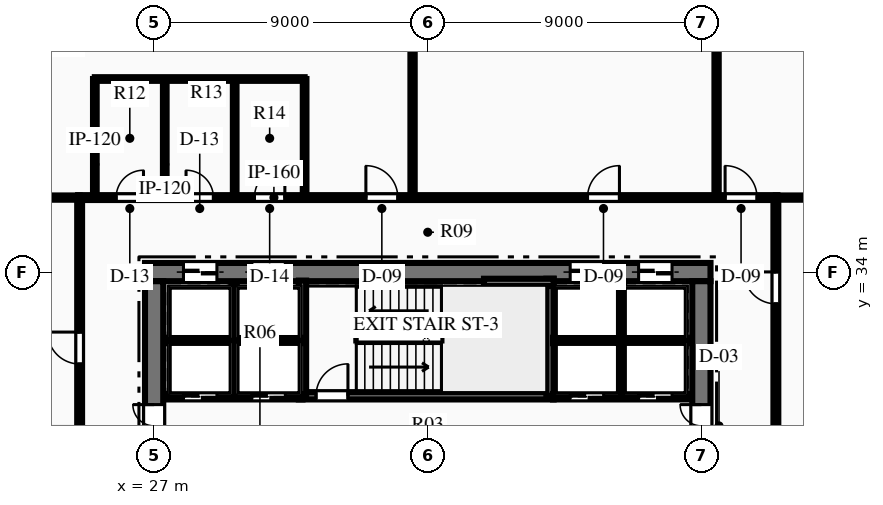
"""IFC4 building model, lengths in metres.
Left out: names, types, materials, properties, quantities, classifications, styles, units other than length and angle.
Written with IfcOpenShell. Run it as: python <this file> out.ifc"""

import sys

from ifc_helpers import new_model, si_unit, direction, frame, frame_2d, origin, place, context, subcontext, project, spatial, rectangle, extrude, element, fill, save


model = new_model("IFC4")
c1 = context("Model", 3, precision=1e-05, world=origin(), true_north=direction((0.0, 1.0)))
c2 = subcontext(c1, "Body", "Model", "MODEL_VIEW")
j1 = project(units=[si_unit("LENGTHUNIT", "METRE"), si_unit("PLANEANGLEUNIT", "RADIAN")], contexts=[c1])
p1 = place(None, origin())
s1 = spatial("IfcSite", under=j1, at=p1, CompositionType="ELEMENT")
p2 = place(p1, origin())
s2 = spatial("IfcBuilding", under=s1, at=p2, CompositionType="ELEMENT")
p3 = place(p2, frame((0.0, 0.0, 73.95)))
s3 = spatial("IfcBuildingStorey", under=s2, at=p3, CompositionType="ELEMENT", Elevation=73.95)
p4 = place(p3, frame((26.7, 34.0, 0.0), z_axis=(0.0, 0.0, 1.0), x_axis=(1.0, 0.0, 0.0)))
e1 = element("IfcWall", 1, at=p4, inside=s3, PredefinedType="SHEAR", context=c2, shape_type="SweptSolid", body=[
    extrude(rectangle(XDim=18.6, YDim=0.6, at=frame_2d((9.3, 0.0))), origin(), (0.0, 0.0, 1.0), 3.75),
])
p5 = place(p4, frame((1.265, 0.0, 0.0)))
e2 = element("IfcOpeningElement", 2, at=p5, cuts=e1, PredefinedType="OPENING", context=c2, shape_type="SweptSolid", body=[
    extrude(rectangle(XDim=1.1, YDim=2.15, at=frame_2d((0.55, 1.075))), frame((0.0, 0.31, 0.0), z_axis=(0.0, -1.0, 0.0), x_axis=(1.0, 0.0, 0.0)), (0.0, 0.0, 1.0), 0.62),
])
p6 = place(p4, frame((3.515, 0.0, 0.0)))
e3 = element("IfcOpeningElement", 3, at=p6, cuts=e1, PredefinedType="OPENING", context=c2, shape_type="SweptSolid", body=[
    extrude(rectangle(XDim=1.1, YDim=2.15, at=frame_2d((0.55, 1.075))), frame((0.0, 0.31, 0.0), z_axis=(0.0, -1.0, 0.0), x_axis=(1.0, 0.0, 0.0)), (0.0, 0.0, 1.0), 0.62),
])
p7 = place(p4, frame((13.985, 0.0, 0.0)))
e4 = element("IfcOpeningElement", 4, at=p7, cuts=e1, PredefinedType="OPENING", context=c2, shape_type="SweptSolid", body=[
    extrude(rectangle(XDim=1.1, YDim=2.15, at=frame_2d((0.55, 1.075))), frame((0.0, 0.31, 0.0), z_axis=(0.0, -1.0, 0.0), x_axis=(1.0, 0.0, 0.0)), (0.0, 0.0, 1.0), 0.62),
])
p8 = place(p4, frame((16.235, 0.0, 0.0)))
e5 = element("IfcOpeningElement", 5, at=p8, cuts=e1, PredefinedType="OPENING", context=c2, shape_type="SweptSolid", body=[
    extrude(rectangle(XDim=1.1, YDim=2.15, at=frame_2d((0.55, 1.075))), frame((0.0, 0.31, 0.0), z_axis=(0.0, -1.0, 0.0), x_axis=(1.0, 0.0, 0.0)), (0.0, 0.0, 1.0), 0.62),
])
p9 = place(p3, frame((27.0, 18.3, 0.0), z_axis=(0.0, 0.0, 1.0), x_axis=(0.0, 1.0, 0.0)))
e6 = element("IfcWall", 6, at=p9, inside=s3, PredefinedType="SHEAR", context=c2, shape_type="SweptSolid", body=[
    extrude(rectangle(XDim=15.4, YDim=0.6, at=frame_2d((7.7, 0.0))), origin(), (0.0, 0.0, 1.0), 3.75),
])
p10 = place(p9, frame((9.94, 0.0, 0.0)))
e7 = element("IfcOpeningElement", 7, at=p10, cuts=e6, PredefinedType="OPENING", context=c2, shape_type="SweptSolid", body=[
    extrude(rectangle(XDim=1.4, YDim=2.2, at=frame_2d((0.7, 1.1))), frame((0.0, 0.31, 0.0), z_axis=(0.0, -1.0, 0.0), x_axis=(1.0, 0.0, 0.0)), (0.0, 0.0, 1.0), 0.62),
])
p11 = place(p3, frame((45.0, 18.3, 0.0), z_axis=(0.0, 0.0, 1.0), x_axis=(0.0, 1.0, 0.0)))
e8 = element("IfcWall", 8, at=p11, inside=s3, PredefinedType="SHEAR", context=c2, shape_type="SweptSolid", body=[
    extrude(rectangle(XDim=15.4, YDim=0.6, at=frame_2d((7.7, 0.0))), origin(), (0.0, 0.0, 1.0), 3.75),
])
p12 = place(p11, frame((9.94, 0.0, 0.0)))
e9 = element("IfcOpeningElement", 9, at=p12, cuts=e8, PredefinedType="OPENING", context=c2, shape_type="SweptSolid", body=[
    extrude(rectangle(XDim=1.4, YDim=2.2, at=frame_2d((0.7, 1.1))), frame((0.0, 0.31, 0.0), z_axis=(0.0, -1.0, 0.0), x_axis=(1.0, 0.0, 0.0)), (0.0, 0.0, 1.0), 0.62),
])
p13 = place(p3, frame((31.76, 29.93, 0.0), z_axis=(0.0, 0.0, 1.0), x_axis=(1.0, 0.0, 0.0)))
e10 = element("IfcWall", 10, at=p13, inside=s3, PredefinedType="SHEAR", context=c2, shape_type="SweptSolid", body=[
    extrude(rectangle(XDim=8.38, YDim=0.24, at=frame_2d((4.19, 0.0))), origin(), (0.0, 0.0, 1.0), 3.75),
])
p14 = place(p13, frame((0.565, 0.0, 0.0)))
e11 = element("IfcOpeningElement", 11, at=p14, cuts=e10, PredefinedType="OPENING", context=c2, shape_type="SweptSolid", body=[
    extrude(rectangle(XDim=1.05, YDim=2.15, at=frame_2d((0.525, 1.075))), frame((0.0, 0.13, 0.0), z_axis=(0.0, -1.0, 0.0), x_axis=(1.0, 0.0, 0.0)), (0.0, 0.0, 1.0), 0.26),
])
p15 = place(p3, frame((31.88, 29.93, 0.0), z_axis=(0.0, 0.0, 1.0), x_axis=(0.0, 1.0, 0.0)))
e12 = element("IfcWall", 12, at=p15, inside=s3, PredefinedType="SHEAR", context=c2, shape_type="SweptSolid", body=[
    extrude(rectangle(XDim=3.79, YDim=0.24, at=frame_2d((1.895, 0.0))), origin(), (0.0, 0.0, 1.0), 3.75),
])
p16 = place(p3, frame((40.02, 29.93, 0.0), z_axis=(0.0, 0.0, 1.0), x_axis=(0.0, 1.0, 0.0)))
e13 = element("IfcWall", 13, at=p16, inside=s3, PredefinedType="SHEAR", context=c2, shape_type="SweptSolid", body=[
    extrude(rectangle(XDim=3.85, YDim=0.24, at=frame_2d((1.925, 0.0))), origin(), (0.0, 0.0, 1.0), 3.75),
])
p17 = place(p3, frame((37.85, 33.66, 0.0), z_axis=(0.0, 0.0, 1.0), x_axis=(1.0, 0.0, 0.0)))
e14 = element("IfcWall", 14, at=p17, inside=s3, PredefinedType="SHEAR", context=c2, shape_type="SweptSolid", body=[
    extrude(rectangle(XDim=2.29, YDim=0.24, at=frame_2d((1.145, 0.0))), origin(), (0.0, 0.0, 1.0), 3.75),
])
p18 = place(p3, frame((27.45, 29.9, 0.0), z_axis=(0.0, 0.0, 1.0), x_axis=(1.0, 0.0, 0.0)))
e15 = element("IfcWall", 15, at=p18, inside=s3, PredefinedType="PARTITIONING", context=c2, shape_type="SweptSolid", body=[
    extrude(rectangle(XDim=4.43, YDim=0.18, at=frame_2d((2.215, 0.0))), origin(), (0.0, 0.0, 1.0), 3.44),
])
p19 = place(p18, frame((0.515, 0.0, 0.0)))
e16 = element("IfcOpeningElement", 16, at=p19, cuts=e15, PredefinedType="OPENING", context=c2, shape_type="SweptSolid", body=[
    extrude(rectangle(XDim=1.1, YDim=2.15, at=frame_2d((0.55, 1.075))), frame((0.0, 0.1, 0.0), z_axis=(0.0, -1.0, 0.0), x_axis=(1.0, 0.0, 0.0)), (0.0, 0.0, 1.0), 0.2),
])
p20 = place(p18, frame((2.765, 0.0, 0.0)))
e17 = element("IfcOpeningElement", 17, at=p20, cuts=e15, PredefinedType="OPENING", context=c2, shape_type="SweptSolid", body=[
    extrude(rectangle(XDim=1.1, YDim=2.15, at=frame_2d((0.55, 1.075))), frame((0.0, 0.1, 0.0), z_axis=(0.0, -1.0, 0.0), x_axis=(1.0, 0.0, 0.0)), (0.0, 0.0, 1.0), 0.2),
])
p21 = place(p3, frame((27.45, 31.75, 0.0), z_axis=(0.0, 0.0, 1.0), x_axis=(1.0, 0.0, 0.0)))
e18 = element("IfcWall", 18, at=p21, inside=s3, PredefinedType="PARTITIONING", context=c2, shape_type="SweptSolid", body=[
    extrude(rectangle(XDim=4.43, YDim=0.18, at=frame_2d((2.215, 0.0))), origin(), (0.0, 0.0, 1.0), 3.44),
])
p22 = place(p3, frame((29.63, 29.9, 0.0), z_axis=(0.0, 0.0, 1.0), x_axis=(0.0, 1.0, 0.0)))
e19 = element("IfcWall", 19, at=p22, inside=s3, PredefinedType="PARTITIONING", context=c2, shape_type="SweptSolid", body=[
    extrude(rectangle(XDim=3.75, YDim=0.18, at=frame_2d((1.875, 0.0))), origin(), (0.0, 0.0, 1.0), 3.44),
])
p23 = place(p3, frame((40.12, 29.9, 0.0), z_axis=(0.0, 0.0, 1.0), x_axis=(1.0, 0.0, 0.0)))
e20 = element("IfcWall", 20, at=p23, inside=s3, PredefinedType="PARTITIONING", context=c2, shape_type="SweptSolid", body=[
    extrude(rectangle(XDim=4.43, YDim=0.18, at=frame_2d((2.215, 0.0))), origin(), (0.0, 0.0, 1.0), 3.44),
])
p24 = place(p23, frame((0.565, 0.0, 0.0)))
e21 = element("IfcOpeningElement", 21, at=p24, cuts=e20, PredefinedType="OPENING", context=c2, shape_type="SweptSolid", body=[
    extrude(rectangle(XDim=1.1, YDim=2.15, at=frame_2d((0.55, 1.075))), frame((0.0, 0.1, 0.0), z_axis=(0.0, -1.0, 0.0), x_axis=(1.0, 0.0, 0.0)), (0.0, 0.0, 1.0), 0.2),
])
p25 = place(p23, frame((2.815, 0.0, 0.0)))
e22 = element("IfcOpeningElement", 22, at=p25, cuts=e20, PredefinedType="OPENING", context=c2, shape_type="SweptSolid", body=[
    extrude(rectangle(XDim=1.1, YDim=2.15, at=frame_2d((0.55, 1.075))), frame((0.0, 0.1, 0.0), z_axis=(0.0, -1.0, 0.0), x_axis=(1.0, 0.0, 0.0)), (0.0, 0.0, 1.0), 0.2),
])
p26 = place(p3, frame((40.12, 31.75, 0.0), z_axis=(0.0, 0.0, 1.0), x_axis=(1.0, 0.0, 0.0)))
e23 = element("IfcWall", 23, at=p26, inside=s3, PredefinedType="PARTITIONING", context=c2, shape_type="SweptSolid", body=[
    extrude(rectangle(XDim=4.43, YDim=0.18, at=frame_2d((2.215, 0.0))), origin(), (0.0, 0.0, 1.0), 3.44),
])
p27 = place(p3, frame((42.37, 29.9, 0.0), z_axis=(0.0, 0.0, 1.0), x_axis=(0.0, 1.0, 0.0)))
e24 = element("IfcWall", 24, at=p27, inside=s3, PredefinedType="PARTITIONING", context=c2, shape_type="SweptSolid", body=[
    extrude(rectangle(XDim=3.75, YDim=0.18, at=frame_2d((1.875, 0.0))), origin(), (0.0, 0.0, 1.0), 3.44),
])
p28 = place(p3, frame((24.5, 36.45, 0.0), z_axis=(0.0, 0.0, 1.0), x_axis=(1.0, 0.0, 0.0)))
e25 = element("IfcWall", 25, at=p28, inside=s3, PredefinedType="PARTITIONING", context=c2, shape_type="SweptSolid", body=[
    extrude(rectangle(XDim=23.0, YDim=0.16, at=frame_2d((11.5, 0.0))), origin(), (0.0, 0.0, 1.0), 3.44),
])
p29 = place(p28, frame((1.25, 0.0, 0.0)))
e26 = element("IfcOpeningElement", 26, at=p29, cuts=e25, PredefinedType="OPENING", context=c2, shape_type="SweptSolid", body=[
    extrude(rectangle(XDim=0.9, YDim=2.15, at=frame_2d((0.45, 1.075))), frame((0.0, 0.09, 0.0), z_axis=(0.0, -1.0, 0.0), x_axis=(1.0, 0.0, 0.0)), (0.0, 0.0, 1.0), 0.18),
])
p30 = place(p28, frame((3.55, 0.0, 0.0)))
e27 = element("IfcOpeningElement", 27, at=p30, cuts=e25, PredefinedType="OPENING", context=c2, shape_type="SweptSolid", body=[
    extrude(rectangle(XDim=0.9, YDim=2.15, at=frame_2d((0.45, 1.075))), frame((0.0, 0.09, 0.0), z_axis=(0.0, -1.0, 0.0), x_axis=(1.0, 0.0, 0.0)), (0.0, 0.0, 1.0), 0.18),
])
p31 = place(p28, frame((5.8, 0.0, 0.0)))
e28 = element("IfcOpeningElement", 28, at=p31, cuts=e25, PredefinedType="OPENING", context=c2, shape_type="SweptSolid", body=[
    extrude(rectangle(XDim=1.0, YDim=2.15, at=frame_2d((0.5, 1.075))), frame((0.0, 0.09, 0.0), z_axis=(0.0, -1.0, 0.0), x_axis=(1.0, 0.0, 0.0)), (0.0, 0.0, 1.0), 0.18),
])
p32 = place(p28, frame((9.465, 0.0, 0.0)))
e29 = element("IfcOpeningElement", 29, at=p32, cuts=e25, PredefinedType="OPENING", context=c2, shape_type="SweptSolid", body=[
    extrude(rectangle(XDim=1.05, YDim=2.15, at=frame_2d((0.525, 1.075))), frame((0.0, 0.09, 0.0), z_axis=(0.0, -1.0, 0.0), x_axis=(1.0, 0.0, 0.0)), (0.0, 0.0, 1.0), 0.18),
])
p33 = place(p28, frame((16.755, 0.0, 0.0)))
e30 = element("IfcOpeningElement", 30, at=p33, cuts=e25, PredefinedType="OPENING", context=c2, shape_type="SweptSolid", body=[
    extrude(rectangle(XDim=1.05, YDim=2.15, at=frame_2d((0.525, 1.075))), frame((0.0, 0.09, 0.0), z_axis=(0.0, -1.0, 0.0), x_axis=(1.0, 0.0, 0.0)), (0.0, 0.0, 1.0), 0.18),
])
p34 = place(p28, frame((21.28, 0.0, 0.0)))
e31 = element("IfcOpeningElement", 31, at=p34, cuts=e25, PredefinedType="OPENING", context=c2, shape_type="SweptSolid", body=[
    extrude(rectangle(XDim=1.05, YDim=2.15, at=frame_2d((0.525, 1.075))), frame((0.0, 0.09, 0.0), z_axis=(0.0, -1.0, 0.0), x_axis=(1.0, 0.0, 0.0)), (0.0, 0.0, 1.0), 0.18),
])
p35 = place(p3, frame((24.55, 15.55, 0.0), z_axis=(0.0, 0.0, 1.0), x_axis=(0.0, 1.0, 0.0)))
e32 = element("IfcWall", 32, at=p35, inside=s3, PredefinedType="PARTITIONING", context=c2, shape_type="SweptSolid", body=[
    extrude(rectangle(XDim=20.9, YDim=0.16, at=frame_2d((10.45, 0.0))), origin(), (0.0, 0.0, 1.0), 3.44),
])
p36 = place(p35, frame((1.862, 0.0, 0.0)))
e33 = element("IfcOpeningElement", 33, at=p36, cuts=e32, PredefinedType="OPENING", context=c2, shape_type="SweptSolid", body=[
    extrude(rectangle(XDim=1.05, YDim=2.15, at=frame_2d((0.525, 1.075))), frame((0.0, 0.09, 0.0), z_axis=(0.0, -1.0, 0.0), x_axis=(1.0, 0.0, 0.0)), (0.0, 0.0, 1.0), 0.18),
])
p37 = place(p35, frame((10.509, 0.0, 0.0)))
e34 = element("IfcOpeningElement", 34, at=p37, cuts=e32, PredefinedType="OPENING", context=c2, shape_type="SweptSolid", body=[
    extrude(rectangle(XDim=1.05, YDim=2.15, at=frame_2d((0.525, 1.075))), frame((0.0, 0.09, 0.0), z_axis=(0.0, -1.0, 0.0), x_axis=(1.0, 0.0, 0.0)), (0.0, 0.0, 1.0), 0.18),
])
p38 = place(p35, frame((15.426, 0.0, 0.0)))
e35 = element("IfcOpeningElement", 35, at=p38, cuts=e32, PredefinedType="OPENING", context=c2, shape_type="SweptSolid", body=[
    extrude(rectangle(XDim=1.05, YDim=2.15, at=frame_2d((0.525, 1.075))), frame((0.0, 0.09, 0.0), z_axis=(0.0, -1.0, 0.0), x_axis=(1.0, 0.0, 0.0)), (0.0, 0.0, 1.0), 0.18),
])
p39 = place(p3, frame((47.45, 15.55, 0.0), z_axis=(0.0, 0.0, 1.0), x_axis=(0.0, 1.0, 0.0)))
e36 = element("IfcWall", 36, at=p39, inside=s3, PredefinedType="PARTITIONING", context=c2, shape_type="SweptSolid", body=[
    extrude(rectangle(XDim=20.9, YDim=0.16, at=frame_2d((10.45, 0.0))), origin(), (0.0, 0.0, 1.0), 3.44),
])
p40 = place(p39, frame((5.616, 0.0, 0.0)))
e37 = element("IfcOpeningElement", 37, at=p40, cuts=e36, PredefinedType="OPENING", context=c2, shape_type="SweptSolid", body=[
    extrude(rectangle(XDim=1.05, YDim=2.15, at=frame_2d((0.525, 1.075))), frame((0.0, 0.09, 0.0), z_axis=(0.0, -1.0, 0.0), x_axis=(1.0, 0.0, 0.0)), (0.0, 0.0, 1.0), 0.18),
])
p41 = place(p39, frame((17.405, 0.0, 0.0)))
e38 = element("IfcOpeningElement", 38, at=p41, cuts=e36, PredefinedType="OPENING", context=c2, shape_type="SweptSolid", body=[
    extrude(rectangle(XDim=1.05, YDim=2.15, at=frame_2d((0.525, 1.075))), frame((0.0, 0.09, 0.0), z_axis=(0.0, -1.0, 0.0), x_axis=(1.0, 0.0, 0.0)), (0.0, 0.0, 1.0), 0.18),
])
for number, where, z_axis, x_axis in (
    (39, (25.05, 36.45, 0.0), (0.0, 0.0, 1.0), (0.0, 1.0, 0.0)),
    (40, (27.35, 36.45, 0.0), (0.0, 0.0, 1.0), (0.0, 1.0, 0.0)),
    (41, (29.65, 36.45, 0.0), (0.0, 0.0, 1.0), (0.0, 1.0, 0.0)),
    (42, (31.95, 36.45, 0.0), (0.0, 0.0, 1.0), (0.0, 1.0, 0.0)),
):
    element("IfcWall", number, at=place(p3, frame(where, z_axis=z_axis, x_axis=x_axis)), inside=s3, PredefinedType="PARTITIONING", context=c2, shape_type="SweptSolid", body=[
        extrude(rectangle(XDim=3.9, YDim=0.12, at=frame_2d((1.95, 0.0))), origin(), (0.0, 0.0, 1.0), 3.44),
    ])
p42 = place(p3, frame((25.05, 40.35, 0.0), z_axis=(0.0, 0.0, 1.0), x_axis=(1.0, 0.0, 0.0)))
e43 = element("IfcWall", 43, at=p42, inside=s3, PredefinedType="PARTITIONING", context=c2, shape_type="SweptSolid", body=[
    extrude(rectangle(XDim=6.9, YDim=0.12, at=frame_2d((3.45, 0.0))), origin(), (0.0, 0.0, 1.0), 3.44),
])
p43 = place(p3, frame((6.032, 36.45, 0.0), z_axis=(0.0, 0.0, 1.0), x_axis=(1.0, 0.0, 0.0)))
e44 = element("IfcWall", 44, at=p43, inside=s3, PredefinedType="PARTITIONING", context=c2, shape_type="SweptSolid", body=[
    extrude(rectangle(XDim=18.518, YDim=0.14, at=frame_2d((9.259, 0.0))), origin(), (0.0, 0.0, 1.0), 2.972),
])
p44 = place(p3, frame((47.45, 36.45, 0.0), z_axis=(0.0, 0.0, 1.0), x_axis=(1.0, 0.0, 0.0)))
e45 = element("IfcWall", 45, at=p44, inside=s3, PredefinedType="PARTITIONING", context=c2, shape_type="SweptSolid", body=[
    extrude(rectangle(XDim=13.384, YDim=0.14, at=frame_2d((6.692, 0.0))), origin(), (0.0, 0.0, 1.0), 3.44),
])
p45 = place(p3, frame((35.5, 36.45, 0.0), z_axis=(0.0, 0.0, 1.0), x_axis=(0.0, 1.0, 0.0)))
e46 = element("IfcWall", 46, at=p45, inside=s3, PredefinedType="PARTITIONING", context=c2, shape_type="SweptSolid", body=[
    extrude(rectangle(XDim=15.798, YDim=0.14, at=frame_2d((7.899, 0.0))), origin(), (0.0, 0.0, 1.0), 3.44),
])
p46 = place(p3, frame((45.5, 36.45, 0.0), z_axis=(0.0, 0.0, 1.0), x_axis=(0.0, 1.0, 0.0)))
e47 = element("IfcWall", 47, at=p46, inside=s3, PredefinedType="PARTITIONING", context=c2, shape_type="SweptSolid", body=[
    extrude(rectangle(XDim=18.255, YDim=0.14, at=frame_2d((9.127, 0.0))), origin(), (0.0, 0.0, 1.0), 2.972),
])
p47 = place(p14, origin())
e48 = element("IfcDoor", 48, at=p47, inside=s3, OperationType="SINGLE_SWING_RIGHT", PredefinedType="DOOR", context=c2, shape_type="SweptSolid", body=[
    extrude(rectangle(XDim=1.05, YDim=2.15, at=frame_2d((0.525, 1.075))), frame((0.0, 0.025, 0.0), z_axis=(0.0, -1.0, 0.0), x_axis=(1.0, 0.0, 0.0)), (0.0, 0.0, 1.0), 0.05),
])
fill(e11, e48)
p48 = place(p10, origin())
e49 = element("IfcDoor", 49, at=p48, inside=s3, OperationType="DOUBLE_DOOR_SINGLE_SWING", PredefinedType="DOOR", context=c2, shape_type="SweptSolid", body=[
    extrude(rectangle(XDim=1.4, YDim=2.2, at=frame_2d((0.7, 1.1))), frame((0.0, 0.025, 0.0), z_axis=(0.0, -1.0, 0.0), x_axis=(1.0, 0.0, 0.0)), (0.0, 0.0, 1.0), 0.05),
])
fill(e7, e49)
p49 = place(p12, origin())
e50 = element("IfcDoor", 50, at=p49, inside=s3, OperationType="DOUBLE_DOOR_SINGLE_SWING", PredefinedType="DOOR", context=c2, shape_type="SweptSolid", body=[
    extrude(rectangle(XDim=1.4, YDim=2.2, at=frame_2d((0.7, 1.1))), frame((0.0, 0.025, 0.0), z_axis=(0.0, -1.0, 0.0), x_axis=(1.0, 0.0, 0.0)), (0.0, 0.0, 1.0), 0.05),
])
fill(e9, e50)
p50 = place(p29, origin())
e51 = element("IfcDoor", 51, at=p50, inside=s3, OperationType="SINGLE_SWING_RIGHT", PredefinedType="DOOR", context=c2, shape_type="SweptSolid", body=[
    extrude(rectangle(XDim=0.9, YDim=2.15, at=frame_2d((0.45, 1.075))), frame((0.0, 0.025, 0.0), z_axis=(0.0, -1.0, 0.0), x_axis=(1.0, 0.0, 0.0)), (0.0, 0.0, 1.0), 0.05),
])
fill(e26, e51)
p51 = place(p30, origin())
e52 = element("IfcDoor", 52, at=p51, inside=s3, OperationType="SINGLE_SWING_LEFT", PredefinedType="DOOR", context=c2, shape_type="SweptSolid", body=[
    extrude(rectangle(XDim=0.9, YDim=2.15, at=frame_2d((0.45, 1.075))), frame((0.0, 0.025, 0.0), z_axis=(0.0, -1.0, 0.0), x_axis=(1.0, 0.0, 0.0)), (0.0, 0.0, 1.0), 0.05),
])
fill(e27, e52)
p52 = place(p31, origin())
e53 = element("IfcDoor", 53, at=p52, inside=s3, OperationType="SINGLE_SWING_RIGHT", PredefinedType="DOOR", context=c2, shape_type="SweptSolid", body=[
    extrude(rectangle(XDim=1.0, YDim=2.15, at=frame_2d((0.5, 1.075))), frame((0.0, 0.025, 0.0), z_axis=(0.0, -1.0, 0.0), x_axis=(1.0, 0.0, 0.0)), (0.0, 0.0, 1.0), 0.05),
])
fill(e28, e53)
p53 = place(p32, origin())
e54 = element("IfcDoor", 54, at=p53, inside=s3, OperationType="SINGLE_SWING_LEFT", PredefinedType="DOOR", context=c2, shape_type="SweptSolid", body=[
    extrude(rectangle(XDim=1.05, YDim=2.15, at=frame_2d((0.525, 1.075))), frame((0.0, 0.025, 0.0), z_axis=(0.0, -1.0, 0.0), x_axis=(1.0, 0.0, 0.0)), (0.0, 0.0, 1.0), 0.05),
])
fill(e29, e54)
p54 = place(p33, origin())
e55 = element("IfcDoor", 55, at=p54, inside=s3, OperationType="SINGLE_SWING_RIGHT", PredefinedType="DOOR", context=c2, shape_type="SweptSolid", body=[
    extrude(rectangle(XDim=1.05, YDim=2.15, at=frame_2d((0.525, 1.075))), frame((0.0, 0.025, 0.0), z_axis=(0.0, -1.0, 0.0), x_axis=(1.0, 0.0, 0.0)), (0.0, 0.0, 1.0), 0.05),
])
fill(e30, e55)
p55 = place(p34, origin())
e56 = element("IfcDoor", 56, at=p55, inside=s3, OperationType="SINGLE_SWING_LEFT", PredefinedType="DOOR", context=c2, shape_type="SweptSolid", body=[
    extrude(rectangle(XDim=1.05, YDim=2.15, at=frame_2d((0.525, 1.075))), frame((0.0, 0.025, 0.0), z_axis=(0.0, -1.0, 0.0), x_axis=(1.0, 0.0, 0.0)), (0.0, 0.0, 1.0), 0.05),
])
fill(e31, e56)
p56 = place(p38, origin())
e57 = element("IfcDoor", 57, at=p56, inside=s3, OperationType="SINGLE_SWING_RIGHT", PredefinedType="DOOR", context=c2, shape_type="SweptSolid", body=[
    extrude(rectangle(XDim=1.05, YDim=2.15, at=frame_2d((0.525, 1.075))), frame((0.0, 0.025, 0.0), z_axis=(0.0, -1.0, 0.0), x_axis=(1.0, 0.0, 0.0)), (0.0, 0.0, 1.0), 0.05),
])
fill(e35, e57)
p57 = place(p41, origin())
e58 = element("IfcDoor", 58, at=p57, inside=s3, OperationType="SINGLE_SWING_RIGHT", PredefinedType="DOOR", context=c2, shape_type="SweptSolid", body=[
    extrude(rectangle(XDim=1.05, YDim=2.15, at=frame_2d((0.525, 1.075))), frame((0.0, 0.025, 0.0), z_axis=(0.0, -1.0, 0.0), x_axis=(1.0, 0.0, 0.0)), (0.0, 0.0, 1.0), 0.05),
])
fill(e38, e58)
p58 = place(p19, origin())
e59 = element("IfcDoor", 59, at=p58, inside=s3, OperationType="SLIDING_TO_LEFT", PredefinedType="DOOR", context=c2, shape_type="SweptSolid", body=[
    extrude(rectangle(XDim=1.1, YDim=2.15, at=frame_2d((0.55, 1.075))), frame((0.0, 0.025, 0.0), z_axis=(0.0, -1.0, 0.0), x_axis=(1.0, 0.0, 0.0)), (0.0, 0.0, 1.0), 0.05),
])
fill(e16, e59)
p59 = place(p20, origin())
e60 = element("IfcDoor", 60, at=p59, inside=s3, OperationType="SLIDING_TO_LEFT", PredefinedType="DOOR", context=c2, shape_type="SweptSolid", body=[
    extrude(rectangle(XDim=1.1, YDim=2.15, at=frame_2d((0.55, 1.075))), frame((0.0, 0.025, 0.0), z_axis=(0.0, -1.0, 0.0), x_axis=(1.0, 0.0, 0.0)), (0.0, 0.0, 1.0), 0.05),
])
fill(e17, e60)
p60 = place(p5, origin())
e61 = element("IfcDoor", 61, at=p60, inside=s3, OperationType="SLIDING_TO_LEFT", PredefinedType="DOOR", context=c2, shape_type="SweptSolid", body=[
    extrude(rectangle(XDim=1.1, YDim=2.15, at=frame_2d((0.55, 1.075))), frame((0.0, 0.025, 0.0), z_axis=(0.0, -1.0, 0.0), x_axis=(1.0, 0.0, 0.0)), (0.0, 0.0, 1.0), 0.05),
])
fill(e2, e61)
p61 = place(p6, origin())
e62 = element("IfcDoor", 62, at=p61, inside=s3, OperationType="SLIDING_TO_LEFT", PredefinedType="DOOR", context=c2, shape_type="SweptSolid", body=[
    extrude(rectangle(XDim=1.1, YDim=2.15, at=frame_2d((0.55, 1.075))), frame((0.0, 0.025, 0.0), z_axis=(0.0, -1.0, 0.0), x_axis=(1.0, 0.0, 0.0)), (0.0, 0.0, 1.0), 0.05),
])
fill(e3, e62)
p62 = place(p24, origin())
e63 = element("IfcDoor", 63, at=p62, inside=s3, OperationType="SLIDING_TO_LEFT", PredefinedType="DOOR", context=c2, shape_type="SweptSolid", body=[
    extrude(rectangle(XDim=1.1, YDim=2.15, at=frame_2d((0.55, 1.075))), frame((0.0, 0.025, 0.0), z_axis=(0.0, -1.0, 0.0), x_axis=(1.0, 0.0, 0.0)), (0.0, 0.0, 1.0), 0.05),
])
fill(e21, e63)
p63 = place(p25, origin())
e64 = element("IfcDoor", 64, at=p63, inside=s3, OperationType="SLIDING_TO_LEFT", PredefinedType="DOOR", context=c2, shape_type="SweptSolid", body=[
    extrude(rectangle(XDim=1.1, YDim=2.15, at=frame_2d((0.55, 1.075))), frame((0.0, 0.025, 0.0), z_axis=(0.0, -1.0, 0.0), x_axis=(1.0, 0.0, 0.0)), (0.0, 0.0, 1.0), 0.05),
])
fill(e22, e64)
p64 = place(p7, origin())
e65 = element("IfcDoor", 65, at=p64, inside=s3, OperationType="SLIDING_TO_LEFT", PredefinedType="DOOR", context=c2, shape_type="SweptSolid", body=[
    extrude(rectangle(XDim=1.1, YDim=2.15, at=frame_2d((0.55, 1.075))), frame((0.0, 0.025, 0.0), z_axis=(0.0, -1.0, 0.0), x_axis=(1.0, 0.0, 0.0)), (0.0, 0.0, 1.0), 0.05),
])
fill(e4, e65)
p65 = place(p8, origin())
e66 = element("IfcDoor", 66, at=p65, inside=s3, OperationType="SLIDING_TO_LEFT", PredefinedType="DOOR", context=c2, shape_type="SweptSolid", body=[
    extrude(rectangle(XDim=1.1, YDim=2.15, at=frame_2d((0.55, 1.075))), frame((0.0, 0.025, 0.0), z_axis=(0.0, -1.0, 0.0), x_axis=(1.0, 0.0, 0.0)), (0.0, 0.0, 1.0), 0.05),
])
fill(e5, e66)
save(model, sys.argv[1])
